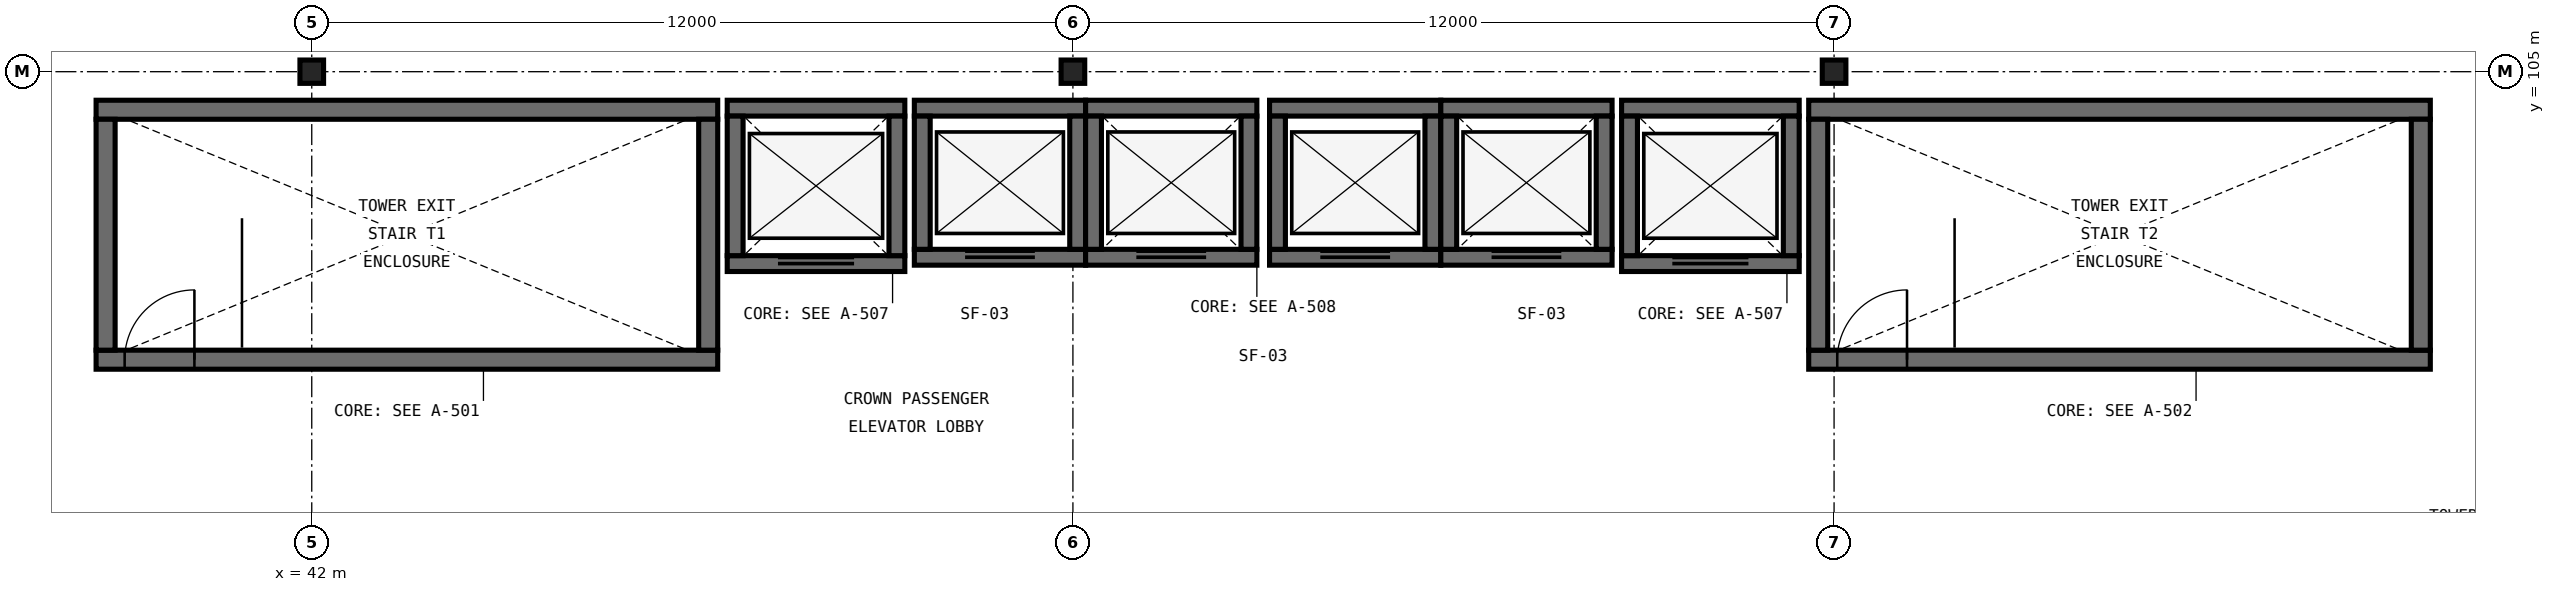
"""IFC4 building model, lengths in metres.
Left out: names, types, materials, properties, quantities, classifications, styles, units other than length and angle.
Written with IfcOpenShell. Run it as: python <this file> out.ifc"""

import sys

from ifc_helpers import new_model, si_unit, direction, frame, frame_2d, origin, origin_2d, place, context, subcontext, project, spatial, rectangle, i_section, extrude, element, fill, save


model = new_model("IFC4")
c1 = context("Model", 3, precision=1e-05, world=origin(), true_north=direction((0.0, 1.0)))
c2 = subcontext(c1, "Body", "Model", "MODEL_VIEW")
j1 = project(units=[si_unit("LENGTHUNIT", "METRE"), si_unit("PLANEANGLEUNIT", "RADIAN")], contexts=[c1])
p1 = place(None, origin())
s1 = spatial("IfcSite", under=j1, at=p1, CompositionType="ELEMENT")
p2 = place(p1, origin())
s2 = spatial("IfcBuilding", under=s1, at=p2, CompositionType="ELEMENT")
p3 = place(p2, frame((0.0, 0.0, 70.8)))
s3 = spatial("IfcBuildingStorey", under=s2, at=p3, CompositionType="ELEMENT", Elevation=70.8)
for number, where, z_axis, x_axis in (
    (1, (42.0, 105.0, 0.0), (0.0, 0.0, 1.0), (1.0, 0.0, 0.0)),
    (2, (54.0, 105.0, 0.0), (0.0, 0.0, 1.0), (1.0, 0.0, 0.0)),
    (3, (66.0, 105.0, 0.0), (0.0, 0.0, 1.0), (1.0, 0.0, 0.0)),
):
    element("IfcColumn", number, at=place(p3, frame(where, z_axis=z_axis, x_axis=x_axis)), inside=s3, PredefinedType="COLUMN", context=c2, shape_type="SweptSolid", body=[
        extrude(i_section(OverallWidth=0.373, OverallDepth=0.368, WebThickness=0.015, FlangeThickness=0.024, FilletRadius=0.031, at=origin_2d()), origin(), (0.0, 0.0, 1.0), 4.8),
    ])
p4 = place(p3, frame((38.6, 100.46, 0.0), z_axis=(0.0, 0.0, 1.0), x_axis=(1.0, 0.0, 0.0)))
e4 = element("IfcWall", 4, at=p4, inside=s3, PredefinedType="SHEAR", context=c2, shape_type="SweptSolid", body=[
    extrude(rectangle(XDim=9.8, YDim=0.3, at=frame_2d((4.9, 0.0))), origin(), (0.0, 0.0, 1.0), 4.8),
])
p5 = place(p4, frame((0.45, 0.0, 0.0)))
e5 = element("IfcOpeningElement", 5, at=p5, cuts=e4, PredefinedType="OPENING", context=c2, shape_type="SweptSolid", body=[
    extrude(rectangle(XDim=1.1, YDim=2.2, at=frame_2d((0.55, 1.1))), frame((0.0, 0.165, 0.0), z_axis=(0.0, -1.0, 0.0), x_axis=(1.0, 0.0, 0.0)), (0.0, 0.0, 1.0), 0.33),
])
p6 = place(p3, frame((48.4, 104.4, 0.0), z_axis=(0.0, 0.0, 1.0), x_axis=(-1.0, 0.0, 0.0)))
e6 = element("IfcWall", 6, at=p6, inside=s3, PredefinedType="SHEAR", context=c2, shape_type="SweptSolid", body=[
    extrude(rectangle(XDim=9.8, YDim=0.3, at=frame_2d((4.9, 0.0))), origin(), (0.0, 0.0, 1.0), 4.8),
])
for number, where, z_axis, x_axis in (
    (7, (38.75, 104.25, 0.0), (0.0, 0.0, 1.0), (0.0, -1.0, 0.0)),
    (8, (48.25, 100.61, 0.0), (0.0, 0.0, 1.0), (0.0, 1.0, 0.0)),
):
    element("IfcWall", number, at=place(p3, frame(where, z_axis=z_axis, x_axis=x_axis)), inside=s3, PredefinedType="SHEAR", context=c2, shape_type="SweptSolid", body=[
        extrude(rectangle(XDim=3.64, YDim=0.3, at=frame_2d((1.82, 0.0))), origin(), (0.0, 0.0, 1.0), 4.8),
    ])
p7 = place(p3, frame((65.6, 100.46, 0.0), z_axis=(0.0, 0.0, 1.0), x_axis=(1.0, 0.0, 0.0)))
e9 = element("IfcWall", 9, at=p7, inside=s3, PredefinedType="SHEAR", context=c2, shape_type="SweptSolid", body=[
    extrude(rectangle(XDim=9.8, YDim=0.3, at=frame_2d((4.9, 0.0))), origin(), (0.0, 0.0, 1.0), 4.8),
])
p8 = place(p7, frame((0.45, 0.0, 0.0)))
e10 = element("IfcOpeningElement", 10, at=p8, cuts=e9, PredefinedType="OPENING", context=c2, shape_type="SweptSolid", body=[
    extrude(rectangle(XDim=1.1, YDim=2.2, at=frame_2d((0.55, 1.1))), frame((0.0, 0.165, 0.0), z_axis=(0.0, -1.0, 0.0), x_axis=(1.0, 0.0, 0.0)), (0.0, 0.0, 1.0), 0.33),
])
p9 = place(p3, frame((75.4, 104.4, 0.0), z_axis=(0.0, 0.0, 1.0), x_axis=(-1.0, 0.0, 0.0)))
e11 = element("IfcWall", 11, at=p9, inside=s3, PredefinedType="SHEAR", context=c2, shape_type="SweptSolid", body=[
    extrude(rectangle(XDim=9.8, YDim=0.3, at=frame_2d((4.9, 0.0))), origin(), (0.0, 0.0, 1.0), 4.8),
])
for number, where, z_axis, x_axis in (
    (12, (65.75, 104.25, 0.0), (0.0, 0.0, 1.0), (0.0, -1.0, 0.0)),
    (13, (75.25, 100.61, 0.0), (0.0, 0.0, 1.0), (0.0, 1.0, 0.0)),
):
    element("IfcWall", number, at=place(p3, frame(where, z_axis=z_axis, x_axis=x_axis)), inside=s3, PredefinedType="SHEAR", context=c2, shape_type="SweptSolid", body=[
        extrude(rectangle(XDim=3.64, YDim=0.3, at=frame_2d((1.82, 0.0))), origin(), (0.0, 0.0, 1.0), 4.8),
    ])
p10 = place(p3, frame((48.55, 101.975, 0.0), z_axis=(0.0, 0.0, 1.0), x_axis=(1.0, 0.0, 0.0)))
e14 = element("IfcWall", 14, at=p10, inside=s3, PredefinedType="SHEAR", context=c2, shape_type="SweptSolid", body=[
    extrude(rectangle(XDim=2.8, YDim=0.25, at=frame_2d((1.4, 0.0))), origin(), (0.0, 0.0, 1.0), 4.8),
])
p11 = place(p10, frame((0.8, 0.0, 0.0)))
e15 = element("IfcOpeningElement", 15, at=p11, cuts=e14, PredefinedType="OPENING", context=c2, shape_type="SweptSolid", body=[
    extrude(rectangle(XDim=1.2, YDim=2.2, at=frame_2d((0.6, 1.1))), frame((0.0, 0.14, 0.0), z_axis=(0.0, -1.0, 0.0), x_axis=(1.0, 0.0, 0.0)), (0.0, 0.0, 1.0), 0.28),
])
p12 = place(p3, frame((51.35, 104.425, 0.0), z_axis=(0.0, 0.0, 1.0), x_axis=(-1.0, 0.0, 0.0)))
e16 = element("IfcWall", 16, at=p12, inside=s3, PredefinedType="SHEAR", context=c2, shape_type="SweptSolid", body=[
    extrude(rectangle(XDim=2.8, YDim=0.25, at=frame_2d((1.4, 0.0))), origin(), (0.0, 0.0, 1.0), 4.8),
])
for number, where, z_axis, x_axis in (
    (17, (48.675, 104.3, 0.0), (0.0, 0.0, 1.0), (0.0, -1.0, 0.0)),
    (18, (51.225, 102.1, 0.0), (0.0, 0.0, 1.0), (0.0, 1.0, 0.0)),
):
    element("IfcWall", number, at=place(p3, frame(where, z_axis=z_axis, x_axis=x_axis)), inside=s3, PredefinedType="SHEAR", context=c2, shape_type="SweptSolid", body=[
        extrude(rectangle(XDim=2.2, YDim=0.25, at=frame_2d((1.1, 0.0))), origin(), (0.0, 0.0, 1.0), 4.8),
    ])
p13 = place(p3, frame((62.65, 101.975, 0.0), z_axis=(0.0, 0.0, 1.0), x_axis=(1.0, 0.0, 0.0)))
e19 = element("IfcWall", 19, at=p13, inside=s3, PredefinedType="SHEAR", context=c2, shape_type="SweptSolid", body=[
    extrude(rectangle(XDim=2.8, YDim=0.25, at=frame_2d((1.4, 0.0))), origin(), (0.0, 0.0, 1.0), 4.8),
])
p14 = place(p13, frame((0.8, 0.0, 0.0)))
e20 = element("IfcOpeningElement", 20, at=p14, cuts=e19, PredefinedType="OPENING", context=c2, shape_type="SweptSolid", body=[
    extrude(rectangle(XDim=1.2, YDim=2.2, at=frame_2d((0.6, 1.1))), frame((0.0, 0.14, 0.0), z_axis=(0.0, -1.0, 0.0), x_axis=(1.0, 0.0, 0.0)), (0.0, 0.0, 1.0), 0.28),
])
p15 = place(p3, frame((65.45, 104.425, 0.0), z_axis=(0.0, 0.0, 1.0), x_axis=(-1.0, 0.0, 0.0)))
e21 = element("IfcWall", 21, at=p15, inside=s3, PredefinedType="SHEAR", context=c2, shape_type="SweptSolid", body=[
    extrude(rectangle(XDim=2.8, YDim=0.25, at=frame_2d((1.4, 0.0))), origin(), (0.0, 0.0, 1.0), 4.8),
])
for number, where, z_axis, x_axis in (
    (22, (62.775, 104.3, 0.0), (0.0, 0.0, 1.0), (0.0, -1.0, 0.0)),
    (23, (65.325, 102.1, 0.0), (0.0, 0.0, 1.0), (0.0, 1.0, 0.0)),
):
    element("IfcWall", number, at=place(p3, frame(where, z_axis=z_axis, x_axis=x_axis)), inside=s3, PredefinedType="SHEAR", context=c2, shape_type="SweptSolid", body=[
        extrude(rectangle(XDim=2.2, YDim=0.25, at=frame_2d((1.1, 0.0))), origin(), (0.0, 0.0, 1.0), 4.8),
    ])
p16 = place(p3, frame((51.5, 102.075, 0.0), z_axis=(0.0, 0.0, 1.0), x_axis=(1.0, 0.0, 0.0)))
e24 = element("IfcWall", 24, at=p16, inside=s3, PredefinedType="SHEAR", context=c2, shape_type="SweptSolid", body=[
    extrude(rectangle(XDim=2.7, YDim=0.25, at=frame_2d((1.35, 0.0))), origin(), (0.0, 0.0, 1.0), 4.8),
])
p17 = place(p16, frame((0.8, 0.0, 0.0)))
e25 = element("IfcOpeningElement", 25, at=p17, cuts=e24, PredefinedType="OPENING", context=c2, shape_type="SweptSolid", body=[
    extrude(rectangle(XDim=1.1, YDim=2.2, at=frame_2d((0.55, 1.1))), frame((0.0, 0.14, 0.0), z_axis=(0.0, -1.0, 0.0), x_axis=(1.0, 0.0, 0.0)), (0.0, 0.0, 1.0), 0.28),
])
p18 = place(p3, frame((54.2, 104.425, 0.0), z_axis=(0.0, 0.0, 1.0), x_axis=(-1.0, 0.0, 0.0)))
e26 = element("IfcWall", 26, at=p18, inside=s3, PredefinedType="SHEAR", context=c2, shape_type="SweptSolid", body=[
    extrude(rectangle(XDim=2.7, YDim=0.25, at=frame_2d((1.35, 0.0))), origin(), (0.0, 0.0, 1.0), 4.8),
])
for number, where, z_axis, x_axis in (
    (27, (51.625, 104.3, 0.0), (0.0, 0.0, 1.0), (0.0, -1.0, 0.0)),
    (28, (54.075, 102.2, 0.0), (0.0, 0.0, 1.0), (0.0, 1.0, 0.0)),
):
    element("IfcWall", number, at=place(p3, frame(where, z_axis=z_axis, x_axis=x_axis)), inside=s3, PredefinedType="SHEAR", context=c2, shape_type="SweptSolid", body=[
        extrude(rectangle(XDim=2.1, YDim=0.25, at=frame_2d((1.05, 0.0))), origin(), (0.0, 0.0, 1.0), 4.8),
    ])
p19 = place(p3, frame((54.2, 102.075, 0.0), z_axis=(0.0, 0.0, 1.0), x_axis=(1.0, 0.0, 0.0)))
e29 = element("IfcWall", 29, at=p19, inside=s3, PredefinedType="SHEAR", context=c2, shape_type="SweptSolid", body=[
    extrude(rectangle(XDim=2.7, YDim=0.25, at=frame_2d((1.35, 0.0))), origin(), (0.0, 0.0, 1.0), 4.8),
])
p20 = place(p19, frame((0.8, 0.0, 0.0)))
e30 = element("IfcOpeningElement", 30, at=p20, cuts=e29, PredefinedType="OPENING", context=c2, shape_type="SweptSolid", body=[
    extrude(rectangle(XDim=1.1, YDim=2.2, at=frame_2d((0.55, 1.1))), frame((0.0, 0.14, 0.0), z_axis=(0.0, -1.0, 0.0), x_axis=(1.0, 0.0, 0.0)), (0.0, 0.0, 1.0), 0.28),
])
p21 = place(p3, frame((56.9, 104.425, 0.0), z_axis=(0.0, 0.0, 1.0), x_axis=(-1.0, 0.0, 0.0)))
e31 = element("IfcWall", 31, at=p21, inside=s3, PredefinedType="SHEAR", context=c2, shape_type="SweptSolid", body=[
    extrude(rectangle(XDim=2.7, YDim=0.25, at=frame_2d((1.35, 0.0))), origin(), (0.0, 0.0, 1.0), 4.8),
])
for number, where, z_axis, x_axis in (
    (32, (54.325, 104.3, 0.0), (0.0, 0.0, 1.0), (0.0, -1.0, 0.0)),
    (33, (56.775, 102.2, 0.0), (0.0, 0.0, 1.0), (0.0, 1.0, 0.0)),
):
    element("IfcWall", number, at=place(p3, frame(where, z_axis=z_axis, x_axis=x_axis)), inside=s3, PredefinedType="SHEAR", context=c2, shape_type="SweptSolid", body=[
        extrude(rectangle(XDim=2.1, YDim=0.25, at=frame_2d((1.05, 0.0))), origin(), (0.0, 0.0, 1.0), 4.8),
    ])
p22 = place(p3, frame((57.1, 102.075, 0.0), z_axis=(0.0, 0.0, 1.0), x_axis=(1.0, 0.0, 0.0)))
e34 = element("IfcWall", 34, at=p22, inside=s3, PredefinedType="SHEAR", context=c2, shape_type="SweptSolid", body=[
    extrude(rectangle(XDim=2.7, YDim=0.25, at=frame_2d((1.35, 0.0))), origin(), (0.0, 0.0, 1.0), 4.8),
])
p23 = place(p22, frame((0.8, 0.0, 0.0)))
e35 = element("IfcOpeningElement", 35, at=p23, cuts=e34, PredefinedType="OPENING", context=c2, shape_type="SweptSolid", body=[
    extrude(rectangle(XDim=1.1, YDim=2.2, at=frame_2d((0.55, 1.1))), frame((0.0, 0.14, 0.0), z_axis=(0.0, -1.0, 0.0), x_axis=(1.0, 0.0, 0.0)), (0.0, 0.0, 1.0), 0.28),
])
p24 = place(p3, frame((59.8, 104.425, 0.0), z_axis=(0.0, 0.0, 1.0), x_axis=(-1.0, 0.0, 0.0)))
e36 = element("IfcWall", 36, at=p24, inside=s3, PredefinedType="SHEAR", context=c2, shape_type="SweptSolid", body=[
    extrude(rectangle(XDim=2.7, YDim=0.25, at=frame_2d((1.35, 0.0))), origin(), (0.0, 0.0, 1.0), 4.8),
])
for number, where, z_axis, x_axis in (
    (37, (57.225, 104.3, 0.0), (0.0, 0.0, 1.0), (0.0, -1.0, 0.0)),
    (38, (59.675, 102.2, 0.0), (0.0, 0.0, 1.0), (0.0, 1.0, 0.0)),
):
    element("IfcWall", number, at=place(p3, frame(where, z_axis=z_axis, x_axis=x_axis)), inside=s3, PredefinedType="SHEAR", context=c2, shape_type="SweptSolid", body=[
        extrude(rectangle(XDim=2.1, YDim=0.25, at=frame_2d((1.05, 0.0))), origin(), (0.0, 0.0, 1.0), 4.8),
    ])
p25 = place(p3, frame((59.8, 102.075, 0.0), z_axis=(0.0, 0.0, 1.0), x_axis=(1.0, 0.0, 0.0)))
e39 = element("IfcWall", 39, at=p25, inside=s3, PredefinedType="SHEAR", context=c2, shape_type="SweptSolid", body=[
    extrude(rectangle(XDim=2.7, YDim=0.25, at=frame_2d((1.35, 0.0))), origin(), (0.0, 0.0, 1.0), 4.8),
])
p26 = place(p25, frame((0.8, 0.0, 0.0)))
e40 = element("IfcOpeningElement", 40, at=p26, cuts=e39, PredefinedType="OPENING", context=c2, shape_type="SweptSolid", body=[
    extrude(rectangle(XDim=1.1, YDim=2.2, at=frame_2d((0.55, 1.1))), frame((0.0, 0.14, 0.0), z_axis=(0.0, -1.0, 0.0), x_axis=(1.0, 0.0, 0.0)), (0.0, 0.0, 1.0), 0.28),
])
p27 = place(p3, frame((62.5, 104.425, 0.0), z_axis=(0.0, 0.0, 1.0), x_axis=(-1.0, 0.0, 0.0)))
e41 = element("IfcWall", 41, at=p27, inside=s3, PredefinedType="SHEAR", context=c2, shape_type="SweptSolid", body=[
    extrude(rectangle(XDim=2.7, YDim=0.25, at=frame_2d((1.35, 0.0))), origin(), (0.0, 0.0, 1.0), 4.8),
])
for number, where, z_axis, x_axis in (
    (42, (59.925, 104.3, 0.0), (0.0, 0.0, 1.0), (0.0, -1.0, 0.0)),
    (43, (62.375, 102.2, 0.0), (0.0, 0.0, 1.0), (0.0, 1.0, 0.0)),
):
    element("IfcWall", number, at=place(p3, frame(where, z_axis=z_axis, x_axis=x_axis)), inside=s3, PredefinedType="SHEAR", context=c2, shape_type="SweptSolid", body=[
        extrude(rectangle(XDim=2.1, YDim=0.25, at=frame_2d((1.05, 0.0))), origin(), (0.0, 0.0, 1.0), 4.8),
    ])
p28 = place(p5, origin())
e44 = element("IfcDoor", 44, at=p28, inside=s3, OperationType="SINGLE_SWING_RIGHT", PredefinedType="DOOR", context=c2, shape_type="SweptSolid", body=[
    extrude(rectangle(XDim=1.1, YDim=2.2, at=frame_2d((0.55, 1.1))), frame((0.0, 0.025, 0.0), z_axis=(0.0, -1.0, 0.0), x_axis=(1.0, 0.0, 0.0)), (0.0, 0.0, 1.0), 0.05),
])
fill(e5, e44)
p29 = place(p3, frame((0.0, 0.0, 4.48)))
p30 = place(p29, frame((39.9, 102.43, 0.0)))
p31 = place(p30, frame((0.0, 0.0, 0.27)))
e45 = element("IfcDoor", 45, at=p31, inside=s3, OperationType="SWING_FIXED_LEFT", PredefinedType="TRAPDOOR", context=c2, shape_type="SweptSolid", body=[
    extrude(rectangle(XDim=1.0, YDim=1.2, at=origin_2d()), origin(), (0.0, 0.0, 1.0), 0.05),
])
p32 = place(p8, origin())
e46 = element("IfcDoor", 46, at=p32, inside=s3, OperationType="SINGLE_SWING_RIGHT", PredefinedType="DOOR", context=c2, shape_type="SweptSolid", body=[
    extrude(rectangle(XDim=1.1, YDim=2.2, at=frame_2d((0.55, 1.1))), frame((0.0, 0.025, 0.0), z_axis=(0.0, -1.0, 0.0), x_axis=(1.0, 0.0, 0.0)), (0.0, 0.0, 1.0), 0.05),
])
fill(e10, e46)
p33 = place(p29, frame((66.9, 102.43, 0.0)))
p34 = place(p33, frame((0.0, 0.0, 0.27)))
e47 = element("IfcDoor", 47, at=p34, inside=s3, OperationType="SWING_FIXED_LEFT", PredefinedType="TRAPDOOR", context=c2, shape_type="SweptSolid", body=[
    extrude(rectangle(XDim=1.0, YDim=1.2, at=origin_2d()), origin(), (0.0, 0.0, 1.0), 0.05),
])
p35 = place(p11, origin())
e48 = element("IfcDoor", 48, at=p35, inside=s3, OperationType="DOUBLE_DOOR_SLIDING", PredefinedType="DOOR", context=c2, shape_type="SweptSolid", body=[
    extrude(rectangle(XDim=1.2, YDim=2.2, at=frame_2d((0.6, 1.1))), frame((0.0, 0.025, 0.0), z_axis=(0.0, -1.0, 0.0), x_axis=(1.0, 0.0, 0.0)), (0.0, 0.0, 1.0), 0.05),
])
fill(e15, e48)
p36 = place(p14, origin())
e49 = element("IfcDoor", 49, at=p36, inside=s3, OperationType="DOUBLE_DOOR_SLIDING", PredefinedType="DOOR", context=c2, shape_type="SweptSolid", body=[
    extrude(rectangle(XDim=1.2, YDim=2.2, at=frame_2d((0.6, 1.1))), frame((0.0, 0.025, 0.0), z_axis=(0.0, -1.0, 0.0), x_axis=(1.0, 0.0, 0.0)), (0.0, 0.0, 1.0), 0.05),
])
fill(e20, e49)
p37 = place(p17, origin())
e50 = element("IfcDoor", 50, at=p37, inside=s3, OperationType="DOUBLE_DOOR_SLIDING", PredefinedType="DOOR", context=c2, shape_type="SweptSolid", body=[
    extrude(rectangle(XDim=1.1, YDim=2.2, at=frame_2d((0.55, 1.1))), frame((0.0, 0.025, 0.0), z_axis=(0.0, -1.0, 0.0), x_axis=(1.0, 0.0, 0.0)), (0.0, 0.0, 1.0), 0.05),
])
fill(e25, e50)
p38 = place(p20, origin())
e51 = element("IfcDoor", 51, at=p38, inside=s3, OperationType="DOUBLE_DOOR_SLIDING", PredefinedType="DOOR", context=c2, shape_type="SweptSolid", body=[
    extrude(rectangle(XDim=1.1, YDim=2.2, at=frame_2d((0.55, 1.1))), frame((0.0, 0.025, 0.0), z_axis=(0.0, -1.0, 0.0), x_axis=(1.0, 0.0, 0.0)), (0.0, 0.0, 1.0), 0.05),
])
fill(e30, e51)
p39 = place(p23, origin())
e52 = element("IfcDoor", 52, at=p39, inside=s3, OperationType="DOUBLE_DOOR_SLIDING", PredefinedType="DOOR", context=c2, shape_type="SweptSolid", body=[
    extrude(rectangle(XDim=1.1, YDim=2.2, at=frame_2d((0.55, 1.1))), frame((0.0, 0.025, 0.0), z_axis=(0.0, -1.0, 0.0), x_axis=(1.0, 0.0, 0.0)), (0.0, 0.0, 1.0), 0.05),
])
fill(e35, e52)
p40 = place(p26, origin())
e53 = element("IfcDoor", 53, at=p40, inside=s3, OperationType="DOUBLE_DOOR_SLIDING", PredefinedType="DOOR", context=c2, shape_type="SweptSolid", body=[
    extrude(rectangle(XDim=1.1, YDim=2.2, at=frame_2d((0.55, 1.1))), frame((0.0, 0.025, 0.0), z_axis=(0.0, -1.0, 0.0), x_axis=(1.0, 0.0, 0.0)), (0.0, 0.0, 1.0), 0.05),
])
fill(e40, e53)
save(model, sys.argv[1])
